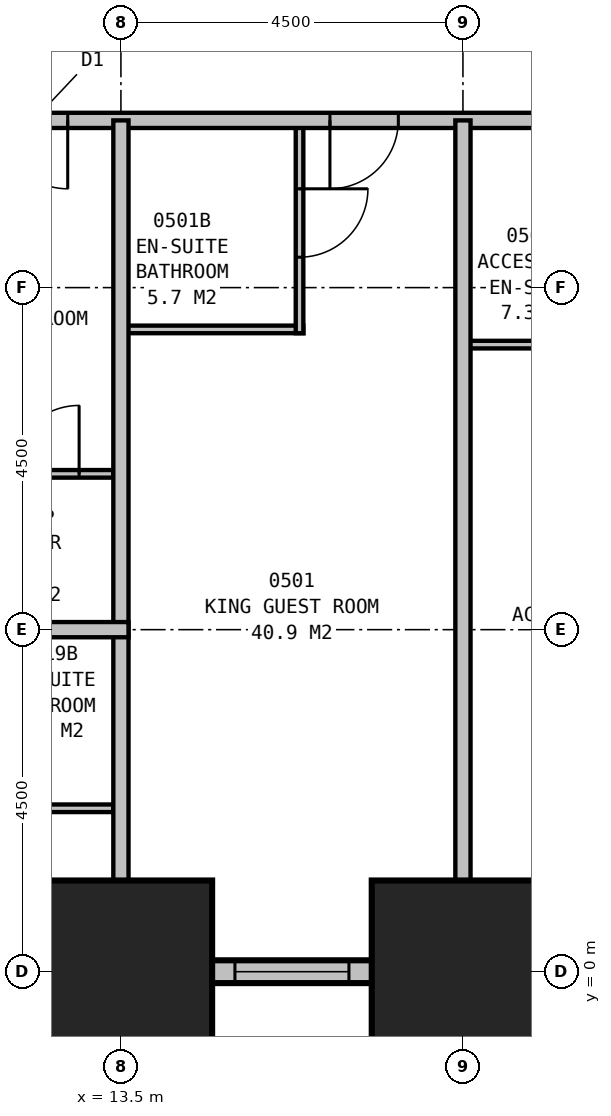
"""IFC4 building model, lengths in metres.
Left out: names, types, materials, properties, quantities, classifications, styles, units other than length and angle.
Written with IfcOpenShell. Run it as: python <this file> out.ifc"""

import sys

from ifc_helpers import new_model, si_unit, direction, frame, frame_2d, origin, origin_2d, place, context, subcontext, project, spatial, rectangle, extrude, element, fill, save


model = new_model("IFC4")
c1 = context("Model", 3, precision=1e-05, world=origin(), true_north=direction((0.0, 1.0)))
c2 = subcontext(c1, "Body", "Model", "MODEL_VIEW")
j1 = project(units=[si_unit("LENGTHUNIT", "METRE"), si_unit("PLANEANGLEUNIT", "RADIAN")], contexts=[c1])
p1 = place(None, origin())
s1 = spatial("IfcSite", under=j1, at=p1, CompositionType="ELEMENT")
p2 = place(p1, origin())
s2 = spatial("IfcBuilding", under=s1, at=p2, CompositionType="ELEMENT")
p3 = place(p2, frame((0.0, 0.0, 29.7)))
s3 = spatial("IfcBuildingStorey", under=s2, at=p3, CompositionType="ELEMENT", Elevation=29.7)
for number, where, z_axis, x_axis in (
    (1, (13.5, 0.0, 0.0), (0.0, 0.0, 1.0), (1.0, 0.0, 0.0)),
    (2, (18.0, 0.0, 0.0), (0.0, 0.0, 1.0), (1.0, 0.0, 0.0)),
):
    element("IfcColumn", number, at=place(p3, frame(where, z_axis=z_axis, x_axis=x_axis)), inside=s3, PredefinedType="COLUMN", context=c2, shape_type="SweptSolid", body=[
        extrude(rectangle(XDim=2.4, YDim=2.4, at=origin_2d()), origin(), (0.0, 0.0, 1.0), 3.5),
    ])
p4 = place(p3, frame((4.35, 0.0, 0.0), z_axis=(0.0, 0.0, 1.0), x_axis=(1.0, 0.0, 0.0)))
e3 = element("IfcWall", 3, at=p4, inside=s3, PredefinedType="STANDARD", context=c2, shape_type="SweptSolid", body=[
    extrude(rectangle(XDim=40.8, YDim=0.3, at=frame_2d((20.4, 0.0))), origin(), (0.0, 0.0, 1.0), 2.05),
])
p5 = place(p4, frame((1.65, 0.0, 0.5)))
e4 = element("IfcOpeningElement", 4, at=p5, cuts=e3, PredefinedType="OPENING", context=c2, shape_type="SweptSolid", body=[
    extrude(rectangle(XDim=1.5, YDim=1.4, at=frame_2d((0.75, 0.7))), frame((0.0, 0.16, 0.0), z_axis=(0.0, -1.0, 0.0), x_axis=(1.0, 0.0, 0.0)), (0.0, 0.0, 1.0), 0.32),
])
p6 = place(p4, frame((6.15, 0.0, 0.5)))
e5 = element("IfcOpeningElement", 5, at=p6, cuts=e3, PredefinedType="OPENING", context=c2, shape_type="SweptSolid", body=[
    extrude(rectangle(XDim=1.5, YDim=1.4, at=frame_2d((0.75, 0.7))), frame((0.0, 0.16, 0.0), z_axis=(0.0, -1.0, 0.0), x_axis=(1.0, 0.0, 0.0)), (0.0, 0.0, 1.0), 0.32),
])
p7 = place(p4, frame((10.65, 0.0, 0.5)))
e6 = element("IfcOpeningElement", 6, at=p7, cuts=e3, PredefinedType="OPENING", context=c2, shape_type="SweptSolid", body=[
    extrude(rectangle(XDim=1.5, YDim=1.4, at=frame_2d((0.75, 0.7))), frame((0.0, 0.16, 0.0), z_axis=(0.0, -1.0, 0.0), x_axis=(1.0, 0.0, 0.0)), (0.0, 0.0, 1.0), 0.32),
])
p8 = place(p4, frame((15.15, 0.0, 0.5)))
e7 = element("IfcOpeningElement", 7, at=p8, cuts=e3, PredefinedType="OPENING", context=c2, shape_type="SweptSolid", body=[
    extrude(rectangle(XDim=1.5, YDim=1.4, at=frame_2d((0.75, 0.7))), frame((0.0, 0.16, 0.0), z_axis=(0.0, -1.0, 0.0), x_axis=(1.0, 0.0, 0.0)), (0.0, 0.0, 1.0), 0.32),
])
p9 = place(p4, frame((19.65, 0.0, 0.5)))
e8 = element("IfcOpeningElement", 8, at=p9, cuts=e3, PredefinedType="OPENING", context=c2, shape_type="SweptSolid", body=[
    extrude(rectangle(XDim=1.5, YDim=1.4, at=frame_2d((0.75, 0.7))), frame((0.0, 0.16, 0.0), z_axis=(0.0, -1.0, 0.0), x_axis=(1.0, 0.0, 0.0)), (0.0, 0.0, 1.0), 0.32),
])
p10 = place(p4, frame((24.15, 0.0, 0.5)))
e9 = element("IfcOpeningElement", 9, at=p10, cuts=e3, PredefinedType="OPENING", context=c2, shape_type="SweptSolid", body=[
    extrude(rectangle(XDim=1.5, YDim=1.4, at=frame_2d((0.75, 0.7))), frame((0.0, 0.16, 0.0), z_axis=(0.0, -1.0, 0.0), x_axis=(1.0, 0.0, 0.0)), (0.0, 0.0, 1.0), 0.32),
])
p11 = place(p4, frame((28.65, 0.0, 0.5)))
e10 = element("IfcOpeningElement", 10, at=p11, cuts=e3, PredefinedType="OPENING", context=c2, shape_type="SweptSolid", body=[
    extrude(rectangle(XDim=1.5, YDim=1.4, at=frame_2d((0.75, 0.7))), frame((0.0, 0.16, 0.0), z_axis=(0.0, -1.0, 0.0), x_axis=(1.0, 0.0, 0.0)), (0.0, 0.0, 1.0), 0.32),
])
p12 = place(p4, frame((33.15, 0.0, 0.5)))
e11 = element("IfcOpeningElement", 11, at=p12, cuts=e3, PredefinedType="OPENING", context=c2, shape_type="SweptSolid", body=[
    extrude(rectangle(XDim=1.5, YDim=1.4, at=frame_2d((0.75, 0.7))), frame((0.0, 0.16, 0.0), z_axis=(0.0, -1.0, 0.0), x_axis=(1.0, 0.0, 0.0)), (0.0, 0.0, 1.0), 0.32),
])
p13 = place(p4, frame((37.65, 0.0, 0.5)))
e12 = element("IfcOpeningElement", 12, at=p13, cuts=e3, PredefinedType="OPENING", context=c2, shape_type="SweptSolid", body=[
    extrude(rectangle(XDim=1.5, YDim=1.4, at=frame_2d((0.75, 0.7))), frame((0.0, 0.16, 0.0), z_axis=(0.0, -1.0, 0.0), x_axis=(1.0, 0.0, 0.0)), (0.0, 0.0, 1.0), 0.32),
])
p14 = place(p3, frame((11.2, 11.2, 0.0), z_axis=(0.0, 0.0, 1.0), x_axis=(1.0, 0.0, 0.0)))
e13 = element("IfcWall", 13, at=p14, inside=s3, PredefinedType="PARTITIONING", context=c2, shape_type="SweptSolid", body=[
    extrude(rectangle(XDim=27.1, YDim=0.2, at=frame_2d((13.55, 0.0))), origin(), (0.0, 0.0, 1.0), 3.25),
])
p15 = place(p14, frame((5.95, 0.0, 0.0), z_axis=(0.0, 0.0, 1.0), x_axis=(-1.0, 0.0, 0.0)))
e14 = element("IfcOpeningElement", 14, at=p15, cuts=e13, PredefinedType="OPENING", context=c2, shape_type="SweptSolid", body=[
    extrude(rectangle(XDim=0.9, YDim=2.1, at=frame_2d((0.45, 1.05))), frame((0.0, 0.11, 0.0), z_axis=(0.0, -1.0, 0.0), x_axis=(1.0, 0.0, 0.0)), (0.0, 0.0, 1.0), 0.22),
])
p16 = place(p14, frame((10.95, 0.0, 0.0), z_axis=(0.0, 0.0, 1.0), x_axis=(-1.0, 0.0, 0.0)))
e15 = element("IfcOpeningElement", 15, at=p16, cuts=e13, PredefinedType="OPENING", context=c2, shape_type="SweptSolid", body=[
    extrude(rectangle(XDim=1.0, YDim=2.1, at=frame_2d((0.5, 1.05))), frame((0.0, 0.11, 0.0), z_axis=(0.0, -1.0, 0.0), x_axis=(1.0, 0.0, 0.0)), (0.0, 0.0, 1.0), 0.22),
])
p17 = place(p14, frame((14.95, 0.0, 0.0), z_axis=(0.0, 0.0, 1.0), x_axis=(-1.0, 0.0, 0.0)))
e16 = element("IfcOpeningElement", 16, at=p17, cuts=e13, PredefinedType="OPENING", context=c2, shape_type="SweptSolid", body=[
    extrude(rectangle(XDim=0.9, YDim=2.1, at=frame_2d((0.45, 1.05))), frame((0.0, 0.11, 0.0), z_axis=(0.0, -1.0, 0.0), x_axis=(1.0, 0.0, 0.0)), (0.0, 0.0, 1.0), 0.22),
])
p18 = place(p14, frame((19.45, 0.0, 0.0), z_axis=(0.0, 0.0, 1.0), x_axis=(-1.0, 0.0, 0.0)))
e17 = element("IfcOpeningElement", 17, at=p18, cuts=e13, PredefinedType="OPENING", context=c2, shape_type="SweptSolid", body=[
    extrude(rectangle(XDim=0.9, YDim=2.1, at=frame_2d((0.45, 1.05))), frame((0.0, 0.11, 0.0), z_axis=(0.0, -1.0, 0.0), x_axis=(1.0, 0.0, 0.0)), (0.0, 0.0, 1.0), 0.22),
])
p19 = place(p14, frame((23.95, 0.0, 0.0), z_axis=(0.0, 0.0, 1.0), x_axis=(-1.0, 0.0, 0.0)))
e18 = element("IfcOpeningElement", 18, at=p19, cuts=e13, PredefinedType="OPENING", context=c2, shape_type="SweptSolid", body=[
    extrude(rectangle(XDim=0.9, YDim=2.1, at=frame_2d((0.45, 1.05))), frame((0.0, 0.11, 0.0), z_axis=(0.0, -1.0, 0.0), x_axis=(1.0, 0.0, 0.0)), (0.0, 0.0, 1.0), 0.22),
])
p20 = place(p14, frame((1.6, 0.0, 0.0), z_axis=(0.0, 0.0, 1.0), x_axis=(-1.0, 0.0, 0.0)))
e19 = element("IfcOpeningElement", 19, at=p20, cuts=e13, PredefinedType="OPENING", context=c2, shape_type="SweptSolid", body=[
    extrude(rectangle(XDim=0.9, YDim=2.1, at=frame_2d((0.45, 1.05))), frame((0.0, 0.11, 0.0), z_axis=(0.0, -1.0, 0.0), x_axis=(1.0, 0.0, 0.0)), (0.0, 0.0, 1.0), 0.22),
])
p21 = place(p14, frame((26.4, 0.0, 0.0), z_axis=(0.0, 0.0, 1.0), x_axis=(-1.0, 0.0, 0.0)))
e20 = element("IfcOpeningElement", 20, at=p21, cuts=e13, PredefinedType="OPENING", context=c2, shape_type="SweptSolid", body=[
    extrude(rectangle(XDim=0.9, YDim=2.1, at=frame_2d((0.45, 1.05))), frame((0.0, 0.11, 0.0), z_axis=(0.0, -1.0, 0.0), x_axis=(1.0, 0.0, 0.0)), (0.0, 0.0, 1.0), 0.22),
])
p22 = place(p3, frame((18.0, 11.2, 0.0), z_axis=(0.0, 0.0, 1.0), x_axis=(0.0, -1.0, 0.0)))
e21 = element("IfcWall", 21, at=p22, inside=s3, PredefinedType="PARTITIONING", context=c2, shape_type="SweptSolid", body=[
    extrude(rectangle(XDim=11.2, YDim=0.2, at=frame_2d((5.6, 0.0))), origin(), (0.0, 0.0, 1.0), 2.25),
])
p23 = place(p3, frame((13.5, 8.45, 0.0), z_axis=(0.0, 0.0, 1.0), x_axis=(1.0, 0.0, 0.0)))
e22 = element("IfcWall", 22, at=p23, inside=s3, PredefinedType="PLUMBINGWALL", context=c2, shape_type="SweptSolid", body=[
    extrude(rectangle(XDim=2.4, YDim=0.1, at=frame_2d((1.2, 0.0))), origin(), (0.0, 0.0, 1.0), 3.25),
])
p24 = place(p3, frame((15.85, 11.2, 0.0), z_axis=(0.0, 0.0, 1.0), x_axis=(0.0, -1.0, 0.0)))
e23 = element("IfcWall", 23, at=p24, inside=s3, PredefinedType="PLUMBINGWALL", context=c2, shape_type="SweptSolid", body=[
    extrude(rectangle(XDim=2.8, YDim=0.1, at=frame_2d((1.4, 0.0))), origin(), (0.0, 0.0, 1.0), 3.25),
])
p25 = place(p24, frame((0.9, 0.0, 0.0)))
e24 = element("IfcOpeningElement", 24, at=p25, cuts=e23, PredefinedType="OPENING", context=c2, shape_type="SweptSolid", body=[
    extrude(rectangle(XDim=0.9, YDim=2.1, at=frame_2d((0.45, 1.05))), frame((0.0, 0.06, 0.0), z_axis=(0.0, -1.0, 0.0), x_axis=(1.0, 0.0, 0.0)), (0.0, 0.0, 1.0), 0.12),
])
p26 = place(p3, frame((18.0, 8.25, 0.0), z_axis=(0.0, 0.0, 1.0), x_axis=(1.0, 0.0, 0.0)))
e25 = element("IfcWall", 25, at=p26, inside=s3, PredefinedType="PLUMBINGWALL", context=c2, shape_type="SweptSolid", body=[
    extrude(rectangle(XDim=2.8, YDim=0.1, at=frame_2d((1.4, 0.0))), origin(), (0.0, 0.0, 1.0), 3.25),
])
p27 = place(p3, frame((13.5, 11.2, 0.0), z_axis=(0.0, 0.0, 1.0), x_axis=(0.0, -1.0, 0.0)))
e26 = element("IfcWall", 26, at=p27, inside=s3, PredefinedType="PARTITIONING", context=c2, shape_type="SweptSolid", body=[
    extrude(rectangle(XDim=11.2, YDim=0.2, at=frame_2d((5.6, 0.0))), origin(), (0.0, 0.0, 1.0), 2.25),
])
p28 = place(p3, frame((13.6, 4.5, 0.0), z_axis=(0.0, 0.0, 1.0), x_axis=(-1.0, 0.0, 0.0)))
e27 = element("IfcWall", 27, at=p28, inside=s3, PredefinedType="PARTITIONING", context=c2, shape_type="SweptSolid", body=[
    extrude(rectangle(XDim=9.1, YDim=0.2, at=frame_2d((4.55, 0.0))), origin(), (0.0, 0.0, 1.0), 3.25),
])
p29 = place(p28, frame((6.85, 0.0, 0.0)))
e28 = element("IfcOpeningElement", 28, at=p29, cuts=e27, PredefinedType="OPENING", context=c2, shape_type="SweptSolid", body=[
    extrude(rectangle(XDim=0.9, YDim=2.1, at=frame_2d((0.45, 1.05))), frame((0.0, 0.11, 0.0), z_axis=(0.0, -1.0, 0.0), x_axis=(1.0, 0.0, 0.0)), (0.0, 0.0, 1.0), 0.22),
])
p30 = place(p3, frame((13.4, 6.55, 0.0), z_axis=(0.0, 0.0, 1.0), x_axis=(-1.0, 0.0, 0.0)))
e29 = element("IfcWall", 29, at=p30, inside=s3, PredefinedType="PLUMBINGWALL", context=c2, shape_type="SweptSolid", body=[
    extrude(rectangle(XDim=1.8, YDim=0.1, at=frame_2d((0.9, 0.0))), origin(), (0.0, 0.0, 1.0), 3.25),
])
p31 = place(p30, frame((1.35, 0.0, 0.0), z_axis=(0.0, 0.0, 1.0), x_axis=(-1.0, 0.0, 0.0)))
e30 = element("IfcOpeningElement", 30, at=p31, cuts=e29, PredefinedType="OPENING", context=c2, shape_type="SweptSolid", body=[
    extrude(rectangle(XDim=0.9, YDim=2.1, at=frame_2d((0.45, 1.05))), frame((0.0, 0.06, 0.0), z_axis=(0.0, -1.0, 0.0), x_axis=(1.0, 0.0, 0.0)), (0.0, 0.0, 1.0), 0.12),
])
p32 = place(p3, frame((13.4, 2.15, 0.0), z_axis=(0.0, 0.0, 1.0), x_axis=(-1.0, 0.0, 0.0)))
e31 = element("IfcWall", 31, at=p32, inside=s3, PredefinedType="PLUMBINGWALL", context=c2, shape_type="SweptSolid", body=[
    extrude(rectangle(XDim=2.7, YDim=0.1, at=frame_2d((1.35, 0.0))), origin(), (0.0, 0.0, 1.0), 3.25),
])
p33 = place(p32, frame((1.1, 0.0, 0.0)))
e32 = element("IfcOpeningElement", 32, at=p33, cuts=e31, PredefinedType="OPENING", context=c2, shape_type="SweptSolid", body=[
    extrude(rectangle(XDim=0.9, YDim=2.1, at=frame_2d((0.45, 1.05))), frame((0.0, 0.06, 0.0), z_axis=(0.0, -1.0, 0.0), x_axis=(1.0, 0.0, 0.0)), (0.0, 0.0, 1.0), 0.12),
])
p34 = place(p7, origin())
e33 = element("IfcWindow", 33, at=p34, inside=s3, PartitioningType="SINGLE_PANEL", PredefinedType="WINDOW", context=c2, shape_type="SweptSolid", body=[
    extrude(rectangle(XDim=1.5, YDim=1.4, at=frame_2d((0.75, 0.7))), frame((0.0, 0.03, 0.0), z_axis=(0.0, -1.0, 0.0), x_axis=(1.0, 0.0, 0.0)), (0.0, 0.0, 1.0), 0.06),
])
fill(e6, e33)
p35 = place(p15, origin())
e34 = element("IfcDoor", 34, at=p35, inside=s3, OperationType="SINGLE_SWING_RIGHT", PredefinedType="DOOR", context=c2, shape_type="SweptSolid", body=[
    extrude(rectangle(XDim=0.9, YDim=2.1, at=frame_2d((0.45, 1.05))), frame((0.0, 0.025, 0.0), z_axis=(0.0, -1.0, 0.0), x_axis=(1.0, 0.0, 0.0)), (0.0, 0.0, 1.0), 0.05),
])
fill(e14, e34)
p36 = place(p20, origin())
e35 = element("IfcDoor", 35, at=p36, inside=s3, OperationType="SINGLE_SWING_LEFT", PredefinedType="DOOR", context=c2, shape_type="SweptSolid", body=[
    extrude(rectangle(XDim=0.9, YDim=2.1, at=frame_2d((0.45, 1.05))), frame((0.0, 0.025, 0.0), z_axis=(0.0, -1.0, 0.0), x_axis=(1.0, 0.0, 0.0)), (0.0, 0.0, 1.0), 0.05),
])
fill(e19, e35)
p37 = place(p25, origin())
e36 = element("IfcDoor", 36, at=p37, inside=s3, OperationType="SINGLE_SWING_LEFT", PredefinedType="DOOR", context=c2, shape_type="SweptSolid", body=[
    extrude(rectangle(XDim=0.9, YDim=2.1, at=frame_2d((0.45, 1.05))), frame((0.0, 0.025, 0.0), z_axis=(0.0, -1.0, 0.0), x_axis=(1.0, 0.0, 0.0)), (0.0, 0.0, 1.0), 0.05),
])
fill(e24, e36)
p38 = place(p31, origin())
e37 = element("IfcDoor", 37, at=p38, inside=s3, OperationType="SINGLE_SWING_RIGHT", PredefinedType="DOOR", context=c2, shape_type="SweptSolid", body=[
    extrude(rectangle(XDim=0.9, YDim=2.1, at=frame_2d((0.45, 1.05))), frame((0.0, 0.025, 0.0), z_axis=(0.0, -1.0, 0.0), x_axis=(1.0, 0.0, 0.0)), (0.0, 0.0, 1.0), 0.05),
])
fill(e30, e37)
save(model, sys.argv[1])
